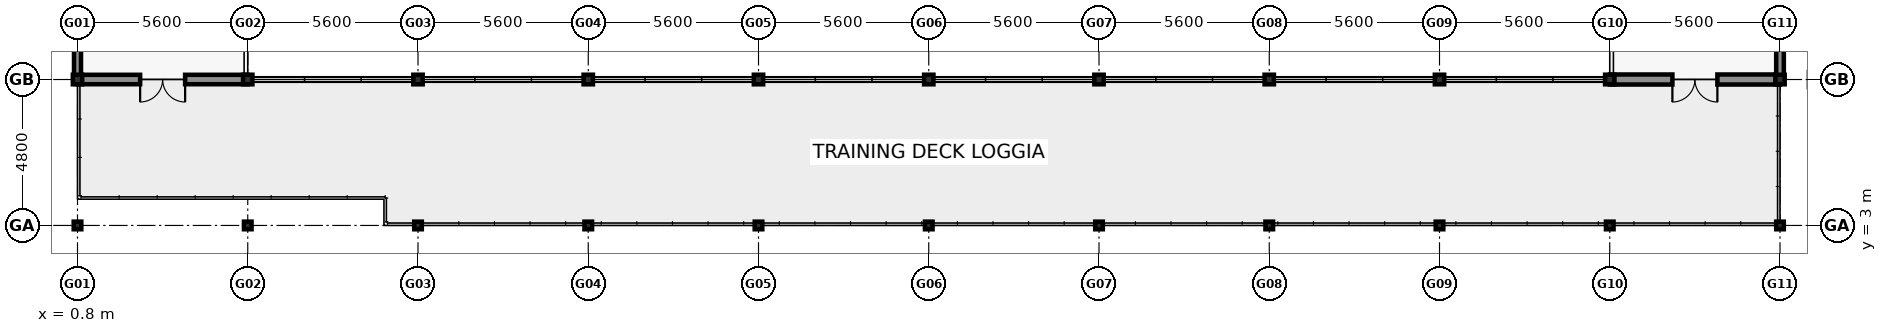
"""IFC4 building model, lengths in metres.
Left out: names, types, materials, properties, quantities, classifications, styles, units other than length and angle.
Written with IfcOpenShell. Run it as: python <this file> out.ifc"""

import sys

from ifc_helpers import new_model, si_unit, direction, frame, frame_2d, origin, origin_2d, place, context, subcontext, project, spatial, rectangle, hollow_rectangle, i_section, extrude, element, fill, save


model = new_model("IFC4")
c1 = context("Model", 3, precision=1e-05, world=origin(), true_north=direction((0.0, 1.0)))
c2 = subcontext(c1, "Body", "Model", "MODEL_VIEW")
j1 = project(units=[si_unit("LENGTHUNIT", "METRE"), si_unit("PLANEANGLEUNIT", "RADIAN")], contexts=[c1])
p1 = place(None, origin())
s1 = spatial("IfcSite", under=j1, at=p1, CompositionType="ELEMENT")
p2 = place(p1, origin())
s2 = spatial("IfcBuilding", under=s1, at=p2, CompositionType="ELEMENT")
p3 = place(p2, frame((0.0, 0.0, 5.4)))
s3 = spatial("IfcBuildingStorey", under=s2, at=p3, CompositionType="ELEMENT", Elevation=5.4)
p4 = place(p3, frame((0.8, 3.0, 0.0), z_axis=(0.0, 0.0, 1.0), x_axis=(1.0, 0.0, 0.0)))
e1 = element("IfcColumn", 1, at=p4, inside=s3, PredefinedType="COLUMN", context=c2, shape_type="SweptSolid", body=[
    extrude(hollow_rectangle(XDim=0.25, YDim=0.25, WallThickness=0.012, at=origin_2d()), origin(), (0.0, 0.0, 1.0), 4.2),
])
p5 = place(p3, frame((0.8, 7.8, 0.0), z_axis=(0.0, 0.0, 1.0), x_axis=(1.0, 0.0, 0.0)))
e2 = element("IfcColumn", 2, at=p5, inside=s3, PredefinedType="COLUMN", context=c2, shape_type="SweptSolid", body=[
    extrude(i_section(OverallWidth=0.307, OverallDepth=0.315, WebThickness=0.012, FlangeThickness=0.019, FilletRadius=0.017, at=origin_2d()), origin(), (0.0, 0.0, 1.0), 4.2),
])
p6 = place(p3, frame((6.4, 3.0, 0.0), z_axis=(0.0, 0.0, 1.0), x_axis=(1.0, 0.0, 0.0)))
e3 = element("IfcColumn", 3, at=p6, inside=s3, PredefinedType="COLUMN", context=c2, shape_type="SweptSolid", body=[
    extrude(hollow_rectangle(XDim=0.25, YDim=0.25, WallThickness=0.012, at=origin_2d()), origin(), (0.0, 0.0, 1.0), 4.2),
])
p7 = place(p3, frame((6.4, 7.8, 0.0), z_axis=(0.0, 0.0, 1.0), x_axis=(1.0, 0.0, 0.0)))
e4 = element("IfcColumn", 4, at=p7, inside=s3, PredefinedType="COLUMN", context=c2, shape_type="SweptSolid", body=[
    extrude(i_section(OverallWidth=0.307, OverallDepth=0.315, WebThickness=0.012, FlangeThickness=0.019, FilletRadius=0.017, at=origin_2d()), origin(), (0.0, 0.0, 1.0), 4.2),
])
p8 = place(p3, frame((12.0, 3.0, 0.0), z_axis=(0.0, 0.0, 1.0), x_axis=(1.0, 0.0, 0.0)))
e5 = element("IfcColumn", 5, at=p8, inside=s3, PredefinedType="COLUMN", context=c2, shape_type="SweptSolid", body=[
    extrude(hollow_rectangle(XDim=0.25, YDim=0.25, WallThickness=0.012, at=origin_2d()), origin(), (0.0, 0.0, 1.0), 4.2),
])
p9 = place(p3, frame((12.0, 7.8, 0.0), z_axis=(0.0, 0.0, 1.0), x_axis=(1.0, 0.0, 0.0)))
e6 = element("IfcColumn", 6, at=p9, inside=s3, PredefinedType="COLUMN", context=c2, shape_type="SweptSolid", body=[
    extrude(i_section(OverallWidth=0.307, OverallDepth=0.315, WebThickness=0.012, FlangeThickness=0.019, FilletRadius=0.017, at=origin_2d()), origin(), (0.0, 0.0, 1.0), 4.2),
])
p10 = place(p3, frame((17.6, 3.0, 0.0), z_axis=(0.0, 0.0, 1.0), x_axis=(1.0, 0.0, 0.0)))
e7 = element("IfcColumn", 7, at=p10, inside=s3, PredefinedType="COLUMN", context=c2, shape_type="SweptSolid", body=[
    extrude(hollow_rectangle(XDim=0.25, YDim=0.25, WallThickness=0.012, at=origin_2d()), origin(), (0.0, 0.0, 1.0), 4.2),
])
p11 = place(p3, frame((17.6, 7.8, 0.0), z_axis=(0.0, 0.0, 1.0), x_axis=(1.0, 0.0, 0.0)))
e8 = element("IfcColumn", 8, at=p11, inside=s3, PredefinedType="COLUMN", context=c2, shape_type="SweptSolid", body=[
    extrude(i_section(OverallWidth=0.307, OverallDepth=0.315, WebThickness=0.012, FlangeThickness=0.019, FilletRadius=0.017, at=origin_2d()), origin(), (0.0, 0.0, 1.0), 4.2),
])
p12 = place(p3, frame((23.2, 3.0, 0.0), z_axis=(0.0, 0.0, 1.0), x_axis=(1.0, 0.0, 0.0)))
e9 = element("IfcColumn", 9, at=p12, inside=s3, PredefinedType="COLUMN", context=c2, shape_type="SweptSolid", body=[
    extrude(hollow_rectangle(XDim=0.25, YDim=0.25, WallThickness=0.012, at=origin_2d()), origin(), (0.0, 0.0, 1.0), 4.2),
])
p13 = place(p3, frame((23.2, 7.8, 0.0), z_axis=(0.0, 0.0, 1.0), x_axis=(1.0, 0.0, 0.0)))
e10 = element("IfcColumn", 10, at=p13, inside=s3, PredefinedType="COLUMN", context=c2, shape_type="SweptSolid", body=[
    extrude(i_section(OverallWidth=0.307, OverallDepth=0.315, WebThickness=0.012, FlangeThickness=0.019, FilletRadius=0.017, at=origin_2d()), origin(), (0.0, 0.0, 1.0), 4.2),
])
p14 = place(p3, frame((28.8, 3.0, 0.0), z_axis=(0.0, 0.0, 1.0), x_axis=(1.0, 0.0, 0.0)))
e11 = element("IfcColumn", 11, at=p14, inside=s3, PredefinedType="COLUMN", context=c2, shape_type="SweptSolid", body=[
    extrude(hollow_rectangle(XDim=0.25, YDim=0.25, WallThickness=0.012, at=origin_2d()), origin(), (0.0, 0.0, 1.0), 4.2),
])
p15 = place(p3, frame((28.8, 7.8, 0.0), z_axis=(0.0, 0.0, 1.0), x_axis=(1.0, 0.0, 0.0)))
e12 = element("IfcColumn", 12, at=p15, inside=s3, PredefinedType="COLUMN", context=c2, shape_type="SweptSolid", body=[
    extrude(i_section(OverallWidth=0.307, OverallDepth=0.315, WebThickness=0.012, FlangeThickness=0.019, FilletRadius=0.017, at=origin_2d()), origin(), (0.0, 0.0, 1.0), 4.2),
])
p16 = place(p3, frame((34.4, 3.0, 0.0), z_axis=(0.0, 0.0, 1.0), x_axis=(1.0, 0.0, 0.0)))
e13 = element("IfcColumn", 13, at=p16, inside=s3, PredefinedType="COLUMN", context=c2, shape_type="SweptSolid", body=[
    extrude(hollow_rectangle(XDim=0.25, YDim=0.25, WallThickness=0.012, at=origin_2d()), origin(), (0.0, 0.0, 1.0), 4.2),
])
p17 = place(p3, frame((34.4, 7.8, 0.0), z_axis=(0.0, 0.0, 1.0), x_axis=(1.0, 0.0, 0.0)))
e14 = element("IfcColumn", 14, at=p17, inside=s3, PredefinedType="COLUMN", context=c2, shape_type="SweptSolid", body=[
    extrude(i_section(OverallWidth=0.307, OverallDepth=0.315, WebThickness=0.012, FlangeThickness=0.019, FilletRadius=0.017, at=origin_2d()), origin(), (0.0, 0.0, 1.0), 4.2),
])
p18 = place(p3, frame((40.0, 3.0, 0.0), z_axis=(0.0, 0.0, 1.0), x_axis=(1.0, 0.0, 0.0)))
e15 = element("IfcColumn", 15, at=p18, inside=s3, PredefinedType="COLUMN", context=c2, shape_type="SweptSolid", body=[
    extrude(hollow_rectangle(XDim=0.25, YDim=0.25, WallThickness=0.012, at=origin_2d()), origin(), (0.0, 0.0, 1.0), 4.2),
])
p19 = place(p3, frame((40.0, 7.8, 0.0), z_axis=(0.0, 0.0, 1.0), x_axis=(1.0, 0.0, 0.0)))
e16 = element("IfcColumn", 16, at=p19, inside=s3, PredefinedType="COLUMN", context=c2, shape_type="SweptSolid", body=[
    extrude(i_section(OverallWidth=0.307, OverallDepth=0.315, WebThickness=0.012, FlangeThickness=0.019, FilletRadius=0.017, at=origin_2d()), origin(), (0.0, 0.0, 1.0), 4.2),
])
p20 = place(p3, frame((45.6, 3.0, 0.0), z_axis=(0.0, 0.0, 1.0), x_axis=(1.0, 0.0, 0.0)))
e17 = element("IfcColumn", 17, at=p20, inside=s3, PredefinedType="COLUMN", context=c2, shape_type="SweptSolid", body=[
    extrude(hollow_rectangle(XDim=0.25, YDim=0.25, WallThickness=0.012, at=origin_2d()), origin(), (0.0, 0.0, 1.0), 4.2),
])
p21 = place(p3, frame((45.6, 7.8, 0.0), z_axis=(0.0, 0.0, 1.0), x_axis=(1.0, 0.0, 0.0)))
e18 = element("IfcColumn", 18, at=p21, inside=s3, PredefinedType="COLUMN", context=c2, shape_type="SweptSolid", body=[
    extrude(i_section(OverallWidth=0.307, OverallDepth=0.315, WebThickness=0.012, FlangeThickness=0.019, FilletRadius=0.017, at=origin_2d()), origin(), (0.0, 0.0, 1.0), 4.2),
])
p22 = place(p3, frame((51.2, 3.0, 0.0), z_axis=(0.0, 0.0, 1.0), x_axis=(1.0, 0.0, 0.0)))
e19 = element("IfcColumn", 19, at=p22, inside=s3, PredefinedType="COLUMN", context=c2, shape_type="SweptSolid", body=[
    extrude(hollow_rectangle(XDim=0.25, YDim=0.25, WallThickness=0.012, at=origin_2d()), origin(), (0.0, 0.0, 1.0), 4.2),
])
p23 = place(p3, frame((51.2, 7.8, 0.0), z_axis=(0.0, 0.0, 1.0), x_axis=(1.0, 0.0, 0.0)))
e20 = element("IfcColumn", 20, at=p23, inside=s3, PredefinedType="COLUMN", context=c2, shape_type="SweptSolid", body=[
    extrude(i_section(OverallWidth=0.307, OverallDepth=0.315, WebThickness=0.012, FlangeThickness=0.019, FilletRadius=0.017, at=origin_2d()), origin(), (0.0, 0.0, 1.0), 4.2),
])
p24 = place(p3, frame((56.8, 3.0, 0.0), z_axis=(0.0, 0.0, 1.0), x_axis=(1.0, 0.0, 0.0)))
e21 = element("IfcColumn", 21, at=p24, inside=s3, PredefinedType="COLUMN", context=c2, shape_type="SweptSolid", body=[
    extrude(hollow_rectangle(XDim=0.25, YDim=0.25, WallThickness=0.012, at=origin_2d()), origin(), (0.0, 0.0, 1.0), 4.2),
])
p25 = place(p3, frame((56.8, 7.8, 0.0), z_axis=(0.0, 0.0, 1.0), x_axis=(1.0, 0.0, 0.0)))
e22 = element("IfcColumn", 22, at=p25, inside=s3, PredefinedType="COLUMN", context=c2, shape_type="SweptSolid", body=[
    extrude(i_section(OverallWidth=0.307, OverallDepth=0.315, WebThickness=0.012, FlangeThickness=0.019, FilletRadius=0.017, at=origin_2d()), origin(), (0.0, 0.0, 1.0), 4.2),
])
p26 = place(p3, frame((6.395, 7.8, 0.0), z_axis=(0.0, 0.0, 1.0), x_axis=(-1.0, 0.0, 0.0)))
e23 = element("IfcWall", 23, at=p26, inside=s3, PredefinedType="SOLIDWALL", context=c2, shape_type="SweptSolid", body=[
    extrude(rectangle(XDim=5.59, YDim=0.31, at=frame_2d((2.795, 0.0))), origin(), (0.0, 0.0, 1.0), 3.32),
])
p27 = place(p26, frame((2.055, 0.0, 0.0)))
e24 = element("IfcOpeningElement", 24, at=p27, cuts=e23, PredefinedType="OPENING", context=c2, shape_type="SweptSolid", body=[
    extrude(rectangle(XDim=1.48, YDim=2.16, at=frame_2d((0.74, 1.08))), frame((0.0, 0.165, 0.0), z_axis=(0.0, -1.0, 0.0), x_axis=(1.0, 0.0, 0.0)), (0.0, 0.0, 1.0), 0.33),
])
p28 = place(p3, frame((56.795, 7.8, 0.0), z_axis=(0.0, 0.0, 1.0), x_axis=(-1.0, 0.0, 0.0)))
e25 = element("IfcWall", 25, at=p28, inside=s3, PredefinedType="SOLIDWALL", context=c2, shape_type="SweptSolid", body=[
    extrude(rectangle(XDim=5.59, YDim=0.33, at=frame_2d((2.795, 0.0))), origin(), (0.0, 0.0, 1.0), 3.32),
])
p29 = place(p28, frame((2.055, 0.0, 0.0)))
e26 = element("IfcOpeningElement", 26, at=p29, cuts=e25, PredefinedType="OPENING", context=c2, shape_type="SweptSolid", body=[
    extrude(rectangle(XDim=1.48, YDim=2.16, at=frame_2d((0.74, 1.08))), frame((0.0, 0.175, 0.0), z_axis=(0.0, -1.0, 0.0), x_axis=(1.0, 0.0, 0.0)), (0.0, 0.0, 1.0), 0.35),
])
p30 = place(p3, frame((0.8, 7.805, 0.0), z_axis=(0.0, 0.0, 1.0), x_axis=(0.0, 1.0, 0.0)))
e27 = element("IfcWall", 27, at=p30, inside=s3, PredefinedType="SOLIDWALL", context=c2, shape_type="SweptSolid", body=[
    extrude(rectangle(XDim=6.59, YDim=0.23, at=frame_2d((3.295, 0.0))), origin(), (0.0, 0.0, 1.0), 3.32),
])
p31 = place(p3, frame((56.8, 14.395, 0.0), z_axis=(0.0, 0.0, 1.0), x_axis=(0.0, -1.0, 0.0)))
e28 = element("IfcWall", 28, at=p31, inside=s3, PredefinedType="SOLIDWALL", context=c2, shape_type="SweptSolid", body=[
    extrude(rectangle(XDim=6.59, YDim=0.25, at=frame_2d((3.295, 0.0))), origin(), (0.0, 0.0, 1.0), 3.32),
])
p32 = place(p27, origin())
e29 = element("IfcDoor", 29, at=p32, inside=s3, OperationType="DOUBLE_DOOR_SINGLE_SWING", PredefinedType="DOOR", context=c2, shape_type="SweptSolid", body=[
    extrude(rectangle(XDim=1.48, YDim=2.16, at=frame_2d((0.74, 1.08))), frame((0.0, 0.025, 0.0), z_axis=(0.0, -1.0, 0.0), x_axis=(1.0, 0.0, 0.0)), (0.0, 0.0, 1.0), 0.05),
])
fill(e24, e29)
p33 = place(p29, origin())
e30 = element("IfcDoor", 30, at=p33, inside=s3, OperationType="DOUBLE_DOOR_SINGLE_SWING", PredefinedType="DOOR", context=c2, shape_type="SweptSolid", body=[
    extrude(rectangle(XDim=1.48, YDim=2.16, at=frame_2d((0.74, 1.08))), frame((0.0, 0.025, 0.0), z_axis=(0.0, -1.0, 0.0), x_axis=(1.0, 0.0, 0.0)), (0.0, 0.0, 1.0), 0.05),
])
fill(e26, e30)
save(model, sys.argv[1])
